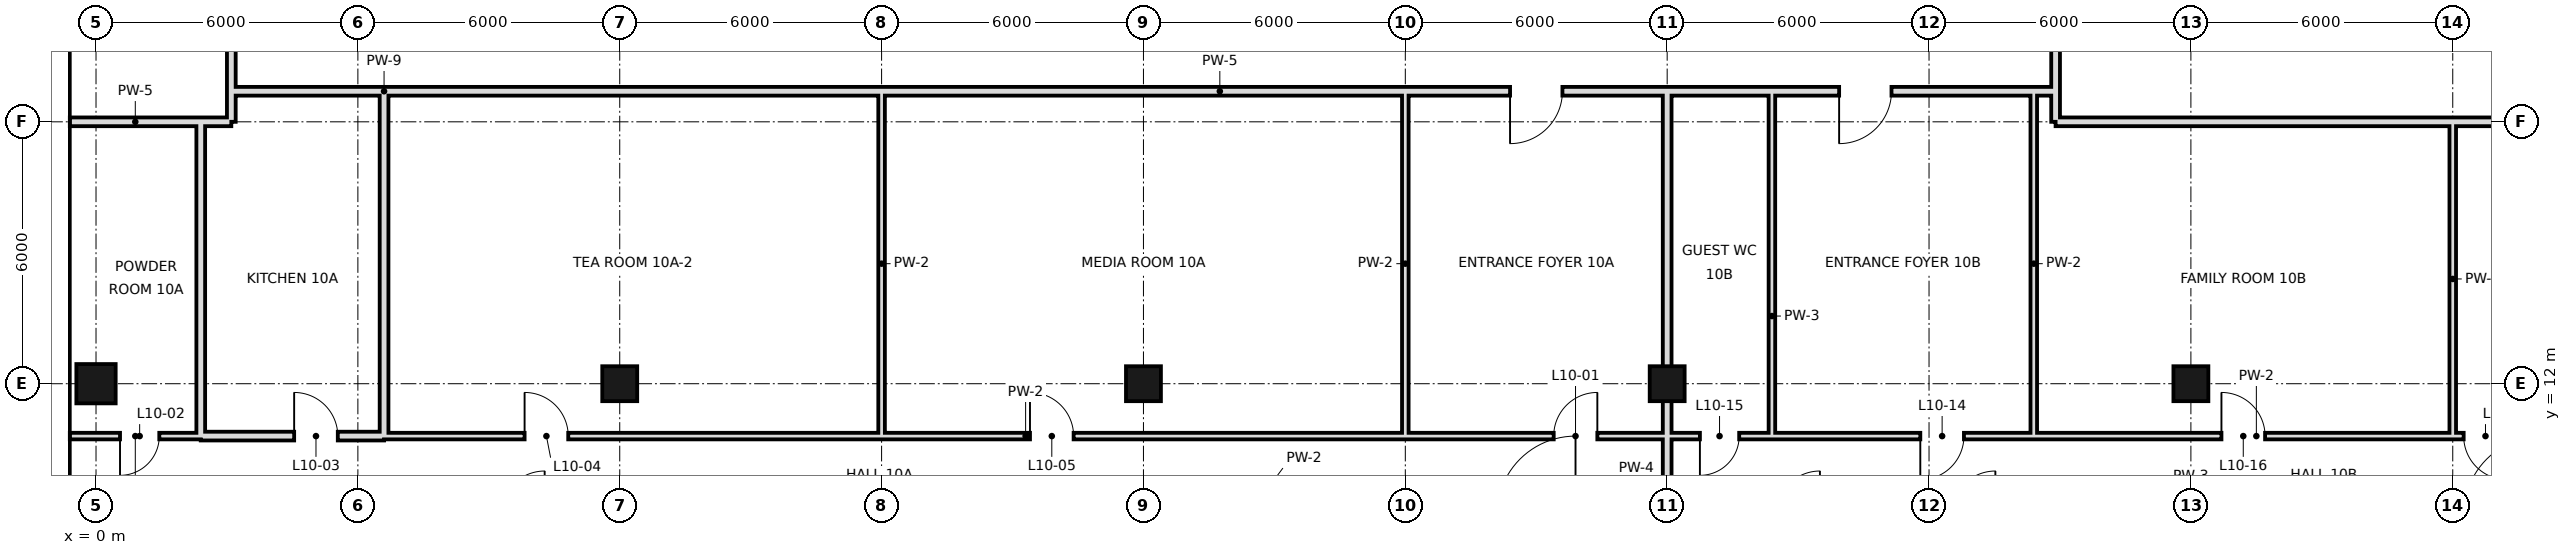
"""IFC4 building model, lengths in metres.
Left out: names, types, materials, properties, quantities, classifications, styles, units other than length and angle.
Written with IfcOpenShell. Run it as: python <this file> out.ifc"""

import sys

from ifc_helpers import new_model, si_unit, direction, frame, frame_2d, origin, origin_2d, place, context, subcontext, project, spatial, rectangle, hollow_rectangle, extrude, element, fill, save


model = new_model("IFC4")
c1 = context("Model", 3, precision=1e-05, world=origin(), true_north=direction((0.0, 1.0)))
c2 = subcontext(c1, "Body", "Model", "MODEL_VIEW")
j1 = project(units=[si_unit("LENGTHUNIT", "METRE"), si_unit("PLANEANGLEUNIT", "RADIAN")], contexts=[c1])
p1 = place(None, origin())
s1 = spatial("IfcSite", under=j1, at=p1, CompositionType="ELEMENT")
p2 = place(p1, origin())
s2 = spatial("IfcBuilding", under=s1, at=p2, CompositionType="ELEMENT")
p3 = place(p2, frame((0.0, 0.0, 57.0)))
s3 = spatial("IfcBuildingStorey", under=s2, at=p3, CompositionType="ELEMENT", Elevation=57.0)
p4 = place(p3, frame((0.0, 12.0, 0.0), z_axis=(0.0, 0.0, 1.0), x_axis=(1.0, 0.0, 0.0)))
e1 = element("IfcColumn", 1, at=p4, inside=s3, PredefinedType="COLUMN", context=c2, shape_type="SweptSolid", body=[
    extrude(hollow_rectangle(XDim=0.9, YDim=0.9, WallThickness=0.045, at=origin_2d()), origin(), (0.0, 0.0, 1.0), 3.6),
])
for number, where, z_axis, x_axis in (
    (2, (12.0, 12.0, 0.0), (0.0, 0.0, 1.0), (1.0, 0.0, 0.0)),
    (3, (24.0, 12.0, 0.0), (0.0, 0.0, 1.0), (1.0, 0.0, 0.0)),
    (4, (36.0, 12.0, 0.0), (0.0, 0.0, 1.0), (1.0, 0.0, 0.0)),
    (5, (48.0, 12.0, 0.0), (0.0, 0.0, 1.0), (1.0, 0.0, 0.0)),
):
    element("IfcColumn", number, at=place(p3, frame(where, z_axis=z_axis, x_axis=x_axis)), inside=s3, PredefinedType="COLUMN", context=c2, shape_type="SweptSolid", body=[
        extrude(hollow_rectangle(XDim=0.8, YDim=0.8, WallThickness=0.04, at=origin_2d()), origin(), (0.0, 0.0, 1.0), 3.6),
    ])
p5 = place(p3, frame((18.0, 10.8, 0.0), z_axis=(0.0, 0.0, 1.0), x_axis=(0.0, 1.0, 0.0)))
e6 = element("IfcWall", 6, at=p5, inside=s3, PredefinedType="PARTITIONING", context=c2, shape_type="SweptSolid", body=[
    extrude(rectangle(XDim=7.9, YDim=0.15, at=frame_2d((3.95, 0.0))), origin(), (0.0, 0.0, 1.0), 2.72),
])
p6 = place(p3, frame((2.4, 10.8, 0.0), z_axis=(0.0, 0.0, 1.0), x_axis=(0.0, 1.0, 0.0)))
e7 = element("IfcWall", 7, at=p6, inside=s3, PredefinedType="SOLIDWALL", context=c2, shape_type="SweptSolid", body=[
    extrude(rectangle(XDim=7.2, YDim=0.2, at=frame_2d((3.6, 0.0))), origin(), (0.0, 0.0, 1.0), 2.72),
])
p7 = place(p3, frame((3.1, 18.7, 0.0), z_axis=(0.0, 0.0, 1.0), x_axis=(0.0, 1.0, 0.0)))
e8 = element("IfcWall", 8, at=p7, inside=s3, PredefinedType="SOLIDWALL", context=c2, shape_type="SweptSolid", body=[
    extrude(rectangle(XDim=27.249, YDim=0.2, at=frame_2d((13.625, 0.0))), origin(), (0.0, 0.0, 1.0), 2.97),
])
p8 = place(p7, frame((17.54, 0.0, 0.0)))
e9 = element("IfcOpeningElement", 9, at=p8, cuts=e8, PredefinedType="OPENING", context=c2, shape_type="SweptSolid", body=[
    extrude(rectangle(XDim=1.2, YDim=2.4, at=frame_2d((0.6, 1.2))), frame((0.0, 0.11, 0.0), z_axis=(0.0, -1.0, 0.0), x_axis=(1.0, 0.0, 0.0)), (0.0, 0.0, 1.0), 0.22),
])
p9 = place(p3, frame((3.1, 18.0, 0.0), z_axis=(0.0, 0.0, 1.0), x_axis=(0.0, 1.0, 0.0)))
e10 = element("IfcWall", 10, at=p9, inside=s3, PredefinedType="SOLIDWALL", context=c2, shape_type="SweptSolid", body=[
    extrude(rectangle(XDim=0.7, YDim=0.2, at=frame_2d((0.35, 0.0))), origin(), (0.0, 0.0, 1.0), 2.97),
])
p10 = place(p3, frame((30.0, 10.8, 0.0), z_axis=(0.0, 0.0, 1.0), x_axis=(0.0, 1.0, 0.0)))
e11 = element("IfcWall", 11, at=p10, inside=s3, PredefinedType="PARTITIONING", context=c2, shape_type="SweptSolid", body=[
    extrude(rectangle(XDim=7.9, YDim=0.15, at=frame_2d((3.95, 0.0))), origin(), (0.0, 0.0, 1.0), 2.72),
])
p11 = place(p3, frame((36.0, 0.0, 0.0), z_axis=(0.0, 0.0, 1.0), x_axis=(0.0, 1.0, 0.0)))
e12 = element("IfcWall", 12, at=p11, inside=s3, PredefinedType="SOLIDWALL", context=c2, shape_type="SweptSolid", body=[
    extrude(rectangle(XDim=18.7, YDim=0.2, at=frame_2d((9.35, 0.0))), origin(), (0.0, 0.0, 1.0), 2.72),
])
for number, where, z_axis, x_axis in (
    (13, (38.4, 10.8, 0.0), (0.0, 0.0, 1.0), (0.0, 1.0, 0.0)),
    (14, (44.4, 10.8, 0.0), (0.0, 0.0, 1.0), (0.0, 1.0, 0.0)),
):
    element("IfcWall", number, at=place(p3, frame(where, z_axis=z_axis, x_axis=x_axis)), inside=s3, PredefinedType="PARTITIONING", context=c2, shape_type="SweptSolid", body=[
        extrude(rectangle(XDim=7.9, YDim=0.15, at=frame_2d((3.95, 0.0))), origin(), (0.0, 0.0, 1.0), 3.42),
    ])
p12 = place(p3, frame((44.9, 18.0, 0.0), z_axis=(0.0, 0.0, 1.0), x_axis=(0.0, 1.0, 0.0)))
e15 = element("IfcWall", 15, at=p12, inside=s3, PredefinedType="SOLIDWALL", context=c2, shape_type="SweptSolid", body=[
    extrude(rectangle(XDim=3.6, YDim=0.2, at=frame_2d((1.8, 0.0))), origin(), (0.0, 0.0, 1.0), 2.97),
])
p13 = place(p3, frame((54.0, 10.8, 0.0), z_axis=(0.0, 0.0, 1.0), x_axis=(0.0, 1.0, 0.0)))
e16 = element("IfcWall", 16, at=p13, inside=s3, PredefinedType="PARTITIONING", context=c2, shape_type="SweptSolid", body=[
    extrude(rectangle(XDim=7.2, YDim=0.15, at=frame_2d((3.6, 0.0))), origin(), (0.0, 0.0, 1.0), 3.42),
])
p14 = place(p3, frame((6.6, 10.8, 0.0), z_axis=(0.0, 0.0, 1.0), x_axis=(0.0, 1.0, 0.0)))
e17 = element("IfcWall", 17, at=p14, inside=s3, PredefinedType="SOLIDWALL", context=c2, shape_type="SweptSolid", body=[
    extrude(rectangle(XDim=7.9, YDim=0.2, at=frame_2d((3.95, 0.0))), origin(), (0.0, 0.0, 1.0), 2.72),
])
p15 = place(p3, frame((2.4, 10.8, 0.0), z_axis=(0.0, 0.0, 1.0), x_axis=(1.0, 0.0, 0.0)))
e18 = element("IfcWall", 18, at=p15, inside=s3, PredefinedType="SOLIDWALL", context=c2, shape_type="SweptSolid", body=[
    extrude(rectangle(XDim=4.2, YDim=0.2, at=frame_2d((2.1, 0.0))), origin(), (0.0, 0.0, 1.0), 2.72),
])
p16 = place(p15, frame((2.14, 0.0, 0.0)))
e19 = element("IfcOpeningElement", 19, at=p16, cuts=e18, PredefinedType="OPENING", context=c2, shape_type="SweptSolid", body=[
    extrude(rectangle(XDim=1.0, YDim=2.4, at=frame_2d((0.5, 1.2))), frame((0.0, 0.11, 0.0), z_axis=(0.0, -1.0, 0.0), x_axis=(1.0, 0.0, 0.0)), (0.0, 0.0, 1.0), 0.22),
])
p17 = place(p3, frame((6.6, 10.8, 0.0), z_axis=(0.0, 0.0, 1.0), x_axis=(1.0, 0.0, 0.0)))
e20 = element("IfcWall", 20, at=p17, inside=s3, PredefinedType="PARTITIONING", context=c2, shape_type="SweptSolid", body=[
    extrude(rectangle(XDim=29.4, YDim=0.15, at=frame_2d((14.7, 0.0))), origin(), (0.0, 0.0, 1.0), 3.42),
])
p18 = place(p17, frame((26.8, 0.0, 0.0)))
e21 = element("IfcOpeningElement", 21, at=p18, cuts=e20, PredefinedType="OPENING", context=c2, shape_type="SweptSolid", body=[
    extrude(rectangle(XDim=1.0, YDim=2.4, at=frame_2d((0.5, 1.2))), frame((0.0, 0.085, 0.0), z_axis=(0.0, -1.0, 0.0), x_axis=(1.0, 0.0, 0.0)), (0.0, 0.0, 1.0), 0.17),
])
p19 = place(p17, frame((3.22, 0.0, 0.0)))
e22 = element("IfcOpeningElement", 22, at=p19, cuts=e20, PredefinedType="OPENING", context=c2, shape_type="SweptSolid", body=[
    extrude(rectangle(XDim=1.0, YDim=2.4, at=frame_2d((0.5, 1.2))), frame((0.0, 0.085, 0.0), z_axis=(0.0, -1.0, 0.0), x_axis=(1.0, 0.0, 0.0)), (0.0, 0.0, 1.0), 0.17),
])
p20 = place(p17, frame((14.8, 0.0, 0.0)))
e23 = element("IfcOpeningElement", 23, at=p20, cuts=e20, PredefinedType="OPENING", context=c2, shape_type="SweptSolid", body=[
    extrude(rectangle(XDim=1.0, YDim=2.4, at=frame_2d((0.5, 1.2))), frame((0.0, 0.085, 0.0), z_axis=(0.0, -1.0, 0.0), x_axis=(1.0, 0.0, 0.0)), (0.0, 0.0, 1.0), 0.17),
])
p21 = place(p3, frame((38.4, 10.8, 0.0), z_axis=(0.0, 0.0, 1.0), x_axis=(1.0, 0.0, 0.0)))
e24 = element("IfcWall", 24, at=p21, inside=s3, PredefinedType="PARTITIONING", context=c2, shape_type="SweptSolid", body=[
    extrude(rectangle(XDim=22.2, YDim=0.15, at=frame_2d((11.1, 0.0))), origin(), (0.0, 0.0, 1.0), 3.42),
])
p22 = place(p21, frame((3.4, 0.0, 0.0)))
e25 = element("IfcOpeningElement", 25, at=p22, cuts=e24, PredefinedType="OPENING", context=c2, shape_type="SweptSolid", body=[
    extrude(rectangle(XDim=1.0, YDim=2.4, at=frame_2d((0.5, 1.2))), frame((0.0, 0.085, 0.0), z_axis=(0.0, -1.0, 0.0), x_axis=(1.0, 0.0, 0.0)), (0.0, 0.0, 1.0), 0.17),
])
p23 = place(p21, frame((10.3, 0.0, 0.0)))
e26 = element("IfcOpeningElement", 26, at=p23, cuts=e24, PredefinedType="OPENING", context=c2, shape_type="SweptSolid", body=[
    extrude(rectangle(XDim=1.0, YDim=2.4, at=frame_2d((0.5, 1.2))), frame((0.0, 0.085, 0.0), z_axis=(0.0, -1.0, 0.0), x_axis=(1.0, 0.0, 0.0)), (0.0, 0.0, 1.0), 0.17),
])
p24 = place(p21, frame((15.85, 0.0, 0.0)))
e27 = element("IfcOpeningElement", 27, at=p24, cuts=e24, PredefinedType="OPENING", context=c2, shape_type="SweptSolid", body=[
    extrude(rectangle(XDim=1.0, YDim=2.4, at=frame_2d((0.5, 1.2))), frame((0.0, 0.085, 0.0), z_axis=(0.0, -1.0, 0.0), x_axis=(1.0, 0.0, 0.0)), (0.0, 0.0, 1.0), 0.17),
])
p25 = place(p3, frame((-0.6, 10.8, 0.0), z_axis=(0.0, 0.0, 1.0), x_axis=(1.0, 0.0, 0.0)))
e28 = element("IfcWall", 28, at=p25, inside=s3, PredefinedType="PARTITIONING", context=c2, shape_type="SweptSolid", body=[
    extrude(rectangle(XDim=3.0, YDim=0.15, at=frame_2d((1.5, 0.0))), origin(), (0.0, 0.0, 1.0), 3.42),
])
p26 = place(p25, frame((1.15, 0.0, 0.0)))
e29 = element("IfcOpeningElement", 29, at=p26, cuts=e28, PredefinedType="OPENING", context=c2, shape_type="SweptSolid", body=[
    extrude(rectangle(XDim=0.9, YDim=2.4, at=frame_2d((0.45, 1.2))), frame((0.0, 0.085, 0.0), z_axis=(0.0, -1.0, 0.0), x_axis=(1.0, 0.0, 0.0)), (0.0, 0.0, 1.0), 0.17),
])
p27 = place(p3, frame((36.0, 10.8, 0.0), z_axis=(0.0, 0.0, 1.0), x_axis=(1.0, 0.0, 0.0)))
e30 = element("IfcWall", 30, at=p27, inside=s3, PredefinedType="PARTITIONING", context=c2, shape_type="SweptSolid", body=[
    extrude(rectangle(XDim=2.4, YDim=0.15, at=frame_2d((1.2, 0.0))), origin(), (0.0, 0.0, 1.0), 3.42),
])
p28 = place(p27, frame((0.75, 0.0, 0.0)))
e31 = element("IfcOpeningElement", 31, at=p28, cuts=e30, PredefinedType="OPENING", context=c2, shape_type="SweptSolid", body=[
    extrude(rectangle(XDim=0.9, YDim=2.4, at=frame_2d((0.45, 1.2))), frame((0.0, 0.085, 0.0), z_axis=(0.0, -1.0, 0.0), x_axis=(1.0, 0.0, 0.0)), (0.0, 0.0, 1.0), 0.17),
])
p29 = place(p3, frame((-0.6, 18.0, 0.0), z_axis=(0.0, 0.0, 1.0), x_axis=(1.0, 0.0, 0.0)))
e32 = element("IfcWall", 32, at=p29, inside=s3, PredefinedType="SOLIDWALL", context=c2, shape_type="SweptSolid", body=[
    extrude(rectangle(XDim=3.0, YDim=0.2, at=frame_2d((1.5, 0.0))), origin(), (0.0, 0.0, 1.0), 2.72),
])
p30 = place(p3, frame((2.4, 18.0, 0.0), z_axis=(0.0, 0.0, 1.0), x_axis=(1.0, 0.0, 0.0)))
e33 = element("IfcWall", 33, at=p30, inside=s3, PredefinedType="SOLIDWALL", context=c2, shape_type="SweptSolid", body=[
    extrude(rectangle(XDim=0.7, YDim=0.2, at=frame_2d((0.35, 0.0))), origin(), (0.0, 0.0, 1.0), 2.97),
])
p31 = place(p3, frame((44.9, 18.0, 0.0), z_axis=(0.0, 0.0, 1.0), x_axis=(1.0, 0.0, 0.0)))
e34 = element("IfcWall", 34, at=p31, inside=s3, PredefinedType="SOLIDWALL", context=c2, shape_type="SweptSolid", body=[
    extrude(rectangle(XDim=10.3, YDim=0.2, at=frame_2d((5.15, 0.0))), origin(), (0.0, 0.0, 1.0), 2.52),
])
p32 = place(p3, frame((6.6, 18.7, 0.0), z_axis=(0.0, 0.0, 1.0), x_axis=(1.0, 0.0, 0.0)))
e35 = element("IfcWall", 35, at=p32, inside=s3, PredefinedType="SOLIDWALL", context=c2, shape_type="SweptSolid", body=[
    extrude(rectangle(XDim=38.3, YDim=0.2, at=frame_2d((19.15, 0.0))), origin(), (0.0, 0.0, 1.0), 2.72),
])
p33 = place(p32, frame((25.8, 0.0, 0.0)))
e36 = element("IfcOpeningElement", 36, at=p33, cuts=e35, PredefinedType="OPENING", context=c2, shape_type="SweptSolid", body=[
    extrude(rectangle(XDim=1.2, YDim=2.4, at=frame_2d((0.6, 1.2))), frame((0.0, 0.11, 0.0), z_axis=(0.0, -1.0, 0.0), x_axis=(1.0, 0.0, 0.0)), (0.0, 0.0, 1.0), 0.22),
])
p34 = place(p32, frame((33.34, 0.0, 0.0)))
e37 = element("IfcOpeningElement", 37, at=p34, cuts=e35, PredefinedType="OPENING", context=c2, shape_type="SweptSolid", body=[
    extrude(rectangle(XDim=1.2, YDim=2.4, at=frame_2d((0.6, 1.2))), frame((0.0, 0.11, 0.0), z_axis=(0.0, -1.0, 0.0), x_axis=(1.0, 0.0, 0.0)), (0.0, 0.0, 1.0), 0.22),
])
p35 = place(p3, frame((3.1, 18.7, 0.0), z_axis=(0.0, 0.0, 1.0), x_axis=(1.0, 0.0, 0.0)))
e38 = element("IfcWall", 38, at=p35, inside=s3, PredefinedType="SOLIDWALL", context=c2, shape_type="SweptSolid", body=[
    extrude(rectangle(XDim=3.5, YDim=0.2, at=frame_2d((1.75, 0.0))), origin(), (0.0, 0.0, 1.0), 2.72),
])
p36 = place(p18, frame((1.0, 0.0, 0.0), z_axis=(0.0, 0.0, 1.0), x_axis=(-1.0, 0.0, 0.0)))
e39 = element("IfcDoor", 39, at=p36, inside=s3, OperationType="SINGLE_SWING_LEFT", PredefinedType="DOOR", context=c2, shape_type="SweptSolid", body=[
    extrude(rectangle(XDim=1.0, YDim=2.4, at=frame_2d((0.5, 1.2))), frame((0.0, 0.025, 0.0), z_axis=(0.0, -1.0, 0.0), x_axis=(1.0, 0.0, 0.0)), (0.0, 0.0, 1.0), 0.05),
])
fill(e21, e39)
p37 = place(p26, frame((0.9, 0.0, 0.0), z_axis=(0.0, 0.0, 1.0), x_axis=(-1.0, 0.0, 0.0)))
e40 = element("IfcDoor", 40, at=p37, inside=s3, OperationType="SINGLE_SWING_RIGHT", PredefinedType="DOOR", context=c2, shape_type="SweptSolid", body=[
    extrude(rectangle(XDim=0.9, YDim=2.4, at=frame_2d((0.45, 1.2))), frame((0.0, 0.025, 0.0), z_axis=(0.0, -1.0, 0.0), x_axis=(1.0, 0.0, 0.0)), (0.0, 0.0, 1.0), 0.05),
])
fill(e29, e40)
p38 = place(p16, origin())
e41 = element("IfcDoor", 41, at=p38, inside=s3, OperationType="SINGLE_SWING_LEFT", PredefinedType="DOOR", context=c2, shape_type="SweptSolid", body=[
    extrude(rectangle(XDim=1.0, YDim=2.4, at=frame_2d((0.5, 1.2))), frame((0.0, 0.025, 0.0), z_axis=(0.0, -1.0, 0.0), x_axis=(1.0, 0.0, 0.0)), (0.0, 0.0, 1.0), 0.05),
])
fill(e19, e41)
p39 = place(p19, origin())
e42 = element("IfcDoor", 42, at=p39, inside=s3, OperationType="SINGLE_SWING_LEFT", PredefinedType="DOOR", context=c2, shape_type="SweptSolid", body=[
    extrude(rectangle(XDim=1.0, YDim=2.4, at=frame_2d((0.5, 1.2))), frame((0.0, 0.025, 0.0), z_axis=(0.0, -1.0, 0.0), x_axis=(1.0, 0.0, 0.0)), (0.0, 0.0, 1.0), 0.05),
])
fill(e22, e42)
p40 = place(p20, origin())
e43 = element("IfcDoor", 43, at=p40, inside=s3, OperationType="SINGLE_SWING_LEFT", PredefinedType="DOOR", context=c2, shape_type="SweptSolid", body=[
    extrude(rectangle(XDim=1.0, YDim=2.4, at=frame_2d((0.5, 1.2))), frame((0.0, 0.025, 0.0), z_axis=(0.0, -1.0, 0.0), x_axis=(1.0, 0.0, 0.0)), (0.0, 0.0, 1.0), 0.05),
])
fill(e23, e43)
p41 = place(p22, frame((1.0, 0.0, 0.0), z_axis=(0.0, 0.0, 1.0), x_axis=(-1.0, 0.0, 0.0)))
e44 = element("IfcDoor", 44, at=p41, inside=s3, OperationType="SINGLE_SWING_RIGHT", PredefinedType="DOOR", context=c2, shape_type="SweptSolid", body=[
    extrude(rectangle(XDim=1.0, YDim=2.4, at=frame_2d((0.5, 1.2))), frame((0.0, 0.025, 0.0), z_axis=(0.0, -1.0, 0.0), x_axis=(1.0, 0.0, 0.0)), (0.0, 0.0, 1.0), 0.05),
])
fill(e25, e44)
p42 = place(p28, frame((0.9, 0.0, 0.0), z_axis=(0.0, 0.0, 1.0), x_axis=(-1.0, 0.0, 0.0)))
e45 = element("IfcDoor", 45, at=p42, inside=s3, OperationType="SINGLE_SWING_RIGHT", PredefinedType="DOOR", context=c2, shape_type="SweptSolid", body=[
    extrude(rectangle(XDim=0.9, YDim=2.4, at=frame_2d((0.45, 1.2))), frame((0.0, 0.025, 0.0), z_axis=(0.0, -1.0, 0.0), x_axis=(1.0, 0.0, 0.0)), (0.0, 0.0, 1.0), 0.05),
])
fill(e31, e45)
p43 = place(p23, origin())
e46 = element("IfcDoor", 46, at=p43, inside=s3, OperationType="SINGLE_SWING_LEFT", PredefinedType="DOOR", context=c2, shape_type="SweptSolid", body=[
    extrude(rectangle(XDim=1.0, YDim=2.4, at=frame_2d((0.5, 1.2))), frame((0.0, 0.025, 0.0), z_axis=(0.0, -1.0, 0.0), x_axis=(1.0, 0.0, 0.0)), (0.0, 0.0, 1.0), 0.05),
])
fill(e26, e46)
p44 = place(p24, origin())
e47 = element("IfcDoor", 47, at=p44, inside=s3, OperationType="SINGLE_SWING_RIGHT", PredefinedType="DOOR", context=c2, shape_type="SweptSolid", body=[
    extrude(rectangle(XDim=1.0, YDim=2.4, at=frame_2d((0.5, 1.2))), frame((0.0, 0.025, 0.0), z_axis=(0.0, -1.0, 0.0), x_axis=(1.0, 0.0, 0.0)), (0.0, 0.0, 1.0), 0.05),
])
fill(e27, e47)
p45 = place(p33, frame((1.2, 0.0, 0.0), z_axis=(0.0, 0.0, 1.0), x_axis=(-1.0, 0.0, 0.0)))
e48 = element("IfcDoor", 48, at=p45, inside=s3, OperationType="SINGLE_SWING_RIGHT", PredefinedType="DOOR", context=c2, shape_type="SweptSolid", body=[
    extrude(rectangle(XDim=1.2, YDim=2.4, at=frame_2d((0.6, 1.2))), frame((0.0, 0.025, 0.0), z_axis=(0.0, -1.0, 0.0), x_axis=(1.0, 0.0, 0.0)), (0.0, 0.0, 1.0), 0.05),
])
fill(e36, e48)
p46 = place(p34, frame((1.2, 0.0, 0.0), z_axis=(0.0, 0.0, 1.0), x_axis=(-1.0, 0.0, 0.0)))
e49 = element("IfcDoor", 49, at=p46, inside=s3, OperationType="SINGLE_SWING_RIGHT", PredefinedType="DOOR", context=c2, shape_type="SweptSolid", body=[
    extrude(rectangle(XDim=1.2, YDim=2.4, at=frame_2d((0.6, 1.2))), frame((0.0, 0.025, 0.0), z_axis=(0.0, -1.0, 0.0), x_axis=(1.0, 0.0, 0.0)), (0.0, 0.0, 1.0), 0.05),
])
fill(e37, e49)
save(model, sys.argv[1])
